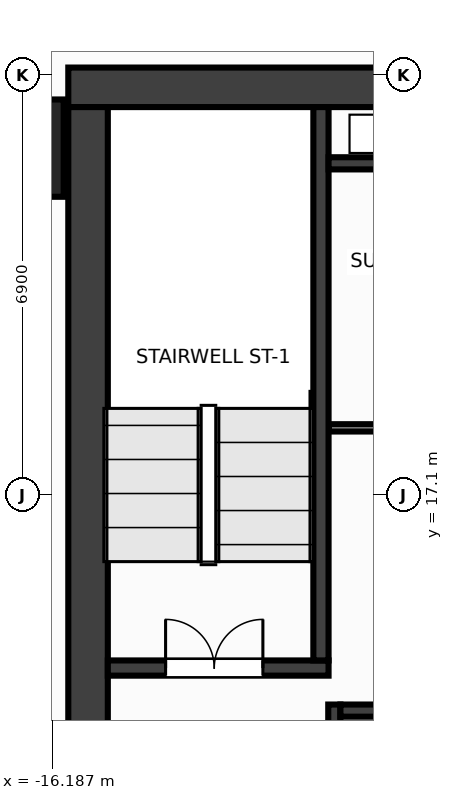
"""IFC4 building model, lengths in metres.
Left out: names, types, materials, properties, quantities, classifications, styles, units other than length and angle.
Written with IfcOpenShell. Run it as: python <this file> out.ifc"""

import sys

from ifc_helpers import new_model, si_unit, direction, frame, frame_2d, origin, origin_2d, place, context, subcontext, project, spatial, rectangle, extrude, source, transform, mapped, element, fill, save


model = new_model("IFC4")
c1 = context("Model", 3, precision=1e-05, world=origin(), true_north=direction((0.0, 1.0)))
c2 = subcontext(c1, "Body", "Model", "MODEL_VIEW")
j1 = project(units=[si_unit("LENGTHUNIT", "METRE"), si_unit("PLANEANGLEUNIT", "RADIAN")], contexts=[c1])
p1 = place(None, origin())
s1 = spatial("IfcSite", under=j1, at=p1, CompositionType="ELEMENT")
p2 = place(p1, origin())
s2 = spatial("IfcBuilding", under=s1, at=p2, CompositionType="ELEMENT")
p3 = place(p2, frame((0.0, 0.0, 99.2)))
s3 = spatial("IfcBuildingStorey", under=s2, at=p3, CompositionType="ELEMENT", Elevation=99.2)
m1 = source(origin(), c2, "Body", "SweptSolid", [
    extrude(rectangle(XDim=31.85, YDim=0.65, at=frame_2d((15.925, 0.0))), origin(), (0.0, 0.0, 1.0), 3.6),
])
p4 = place(p3, frame((-15.925, 23.8, 0.0), z_axis=(0.0, 0.0, 1.0), x_axis=(1.0, 0.0, 0.0)))
e1 = element("IfcWall", 1, at=p4, inside=s3, PredefinedType="SHEAR", context=c2, shape_type="MappedRepresentation", body=[
    mapped(m1, transform((0.0, 0.0, 0.0), x_axis=(1.0, 0.0, 0.0), y_axis=(0.0, 1.0, 0.0), z_axis=(0.0, 0.0, 1.0), scale=1.0)),
])
m2 = source(origin(), c2, "Body", "SweptSolid", [
    extrude(rectangle(XDim=12.95, YDim=0.65, at=frame_2d((6.475, 0.0))), origin(), (0.0, 0.0, 1.0), 3.6),
])
p5 = place(p3, frame((-15.6, 10.525, 0.0), z_axis=(0.0, 0.0, 1.0), x_axis=(0.0, 1.0, 0.0)))
e2 = element("IfcWall", 2, at=p5, inside=s3, PredefinedType="SHEAR", context=c2, shape_type="MappedRepresentation", body=[
    mapped(m2, transform((0.0, 0.0, 0.0), x_axis=(1.0, 0.0, 0.0), y_axis=(0.0, 1.0, 0.0), z_axis=(0.0, 0.0, 1.0), scale=1.0)),
])
m3 = source(origin(), c2, "Body", "SweptSolid", [
    extrude(rectangle(XDim=3.63, YDim=0.25, at=frame_2d((1.815, 0.0))), origin(), (0.0, 0.0, 1.0), 3.6),
])
p6 = place(p3, frame((-15.275, 14.25, 0.0), z_axis=(0.0, 0.0, 1.0), x_axis=(1.0, 0.0, 0.0)))
e3 = element("IfcWall", 3, at=p6, inside=s3, PredefinedType="SHEAR", context=c2, shape_type="MappedRepresentation", body=[
    mapped(m3, transform((0.0, 0.0, 0.0), x_axis=(1.0, 0.0, 0.0), y_axis=(0.0, 1.0, 0.0), z_axis=(0.0, 0.0, 1.0), scale=1.0)),
])
p7 = place(p6, frame((0.95, 0.0, 0.0)))
e4 = element("IfcOpeningElement", 4, at=p7, cuts=e3, PredefinedType="OPENING", context=c2, shape_type="SweptSolid", body=[
    extrude(rectangle(XDim=1.6, YDim=2.15, at=frame_2d((0.8, 1.075))), frame((0.0, 0.137, 0.0), z_axis=(0.0, -1.0, 0.0), x_axis=(1.0, 0.0, 0.0)), (0.0, 0.0, 1.0), 0.274),
])
m4 = source(origin(), c2, "Body", "SweptSolid", [
    extrude(rectangle(XDim=9.1, YDim=0.25, at=frame_2d((4.55, 0.0))), origin(), (0.0, 0.0, 1.0), 3.6),
])
p8 = place(p3, frame((-11.77, 14.375, 0.0), z_axis=(0.0, 0.0, 1.0), x_axis=(0.0, 1.0, 0.0)))
e5 = element("IfcWall", 5, at=p8, inside=s3, PredefinedType="SHEAR", context=c2, shape_type="MappedRepresentation", body=[
    mapped(m4, transform((0.0, 0.0, 0.0), x_axis=(1.0, 0.0, 0.0), y_axis=(0.0, 1.0, 0.0), z_axis=(0.0, 0.0, 1.0), scale=1.0)),
])
m5 = source(origin(), c2, "Body", "SweptSolid", [
    extrude(rectangle(XDim=3.125, YDim=0.2, at=frame_2d((1.562, 0.0))), origin(), (0.0, 0.0, 1.0), 3.6),
])
p9 = place(p3, frame((-11.55, 10.525, 0.0), z_axis=(0.0, 0.0, 1.0), x_axis=(0.0, 1.0, 0.0)))
e6 = element("IfcWall", 6, at=p9, inside=s3, PredefinedType="SHEAR", context=c2, shape_type="MappedRepresentation", body=[
    mapped(m5, transform((0.0, 0.0, 0.0), x_axis=(1.0, 0.0, 0.0), y_axis=(0.0, 1.0, 0.0), z_axis=(0.0, 0.0, 1.0), scale=1.0)),
])
p10 = place(p9, frame((0.9, 0.0, 0.0)))
e7 = element("IfcOpeningElement", 7, at=p10, cuts=e6, PredefinedType="OPENING", context=c2, shape_type="SweptSolid", body=[
    extrude(rectangle(XDim=1.1, YDim=2.15, at=frame_2d((0.55, 1.075))), frame((0.0, 0.112, 0.0), z_axis=(0.0, -1.0, 0.0), x_axis=(1.0, 0.0, 0.0)), (0.0, 0.0, 1.0), 0.224),
])
m6 = source(origin(), c2, "Body", "SweptSolid", [
    extrude(rectangle(XDim=2.825, YDim=0.2, at=frame_2d((1.413, 0.0))), origin(), (0.0, 0.0, 1.0), 3.6),
])
p11 = place(p3, frame((-11.45, 13.55, 0.0), z_axis=(0.0, 0.0, 1.0), x_axis=(1.0, 0.0, 0.0)))
e8 = element("IfcWall", 8, at=p11, inside=s3, PredefinedType="SHEAR", context=c2, shape_type="MappedRepresentation", body=[
    mapped(m6, transform((0.0, 0.0, 0.0), x_axis=(1.0, 0.0, 0.0), y_axis=(0.0, 1.0, 0.0), z_axis=(0.0, 0.0, 1.0), scale=1.0)),
])
m7 = source(origin(), c2, "Body", "SweptSolid", [
    extrude(rectangle(XDim=3.02, YDim=0.2, at=frame_2d((1.51, 0.0))), origin(), (0.0, 0.0, 1.0), 3.6),
])
p12 = place(p3, frame((-11.645, 22.55, 0.0), z_axis=(0.0, 0.0, 1.0), x_axis=(1.0, 0.0, 0.0)))
e9 = element("IfcWall", 9, at=p12, inside=s3, PredefinedType="SHEAR", context=c2, shape_type="MappedRepresentation", body=[
    mapped(m7, transform((0.0, 0.0, 0.0), x_axis=(1.0, 0.0, 0.0), y_axis=(0.0, 1.0, 0.0), z_axis=(0.0, 0.0, 1.0), scale=1.0)),
])
m8 = source(origin(), c2, "Body", "SweptSolid", [
    extrude(rectangle(XDim=1.6, YDim=1.6, at=origin_2d()), origin(), (0.0, 0.0, 1.0), 3.6),
])
p13 = place(p3, frame((-16.8, 22.8, 0.0), z_axis=(0.0, 0.0, 1.0), x_axis=(1.0, 0.0, 0.0)))
e10 = element("IfcColumn", 10, at=p13, inside=s3, PredefinedType="COLUMN", context=c2, shape_type="MappedRepresentation", body=[
    mapped(m8, transform((0.0, 0.0, 0.0), x_axis=(1.0, 0.0, 0.0), y_axis=(0.0, 1.0, 0.0), z_axis=(0.0, 0.0, 1.0), scale=1.0)),
])
m9 = source(origin(), c2, "Body", "SweptSolid", [
    extrude(rectangle(XDim=3.01, YDim=0.12, at=frame_2d((1.505, 0.0))), origin(), (0.0, 0.0, 1.0), 3.36),
])
p14 = place(p3, frame((-11.64, 18.2, 0.0), z_axis=(0.0, 0.0, 1.0), x_axis=(1.0, 0.0, 0.0)))
e11 = element("IfcWall", 11, at=p14, inside=s3, PredefinedType="PARTITIONING", context=c2, shape_type="MappedRepresentation", body=[
    mapped(m9, transform((0.0, 0.0, 0.0), x_axis=(1.0, 0.0, 0.0), y_axis=(0.0, 1.0, 0.0), z_axis=(0.0, 0.0, 1.0), scale=1.0)),
])
m10 = source(origin(), c2, "Body", "SweptSolid", [
    extrude(rectangle(XDim=1.6, YDim=2.15, at=frame_2d((0.8, 1.075))), frame((0.0, 0.025, 0.0), z_axis=(0.0, -1.0, 0.0), x_axis=(1.0, 0.0, 0.0)), (0.0, 0.0, 1.0), 0.05),
])
p15 = place(p7, origin())
e12 = element("IfcDoor", 12, at=p15, inside=s3, OperationType="DOUBLE_DOOR_SINGLE_SWING", PredefinedType="DOOR", context=c2, shape_type="MappedRepresentation", body=[
    mapped(m10, transform((0.0, 0.0, 0.0), x_axis=(1.0, 0.0, 0.0), y_axis=(0.0, 1.0, 0.0), z_axis=(0.0, 0.0, 1.0), scale=1.0)),
])
fill(e4, e12)
save(model, sys.argv[1])
